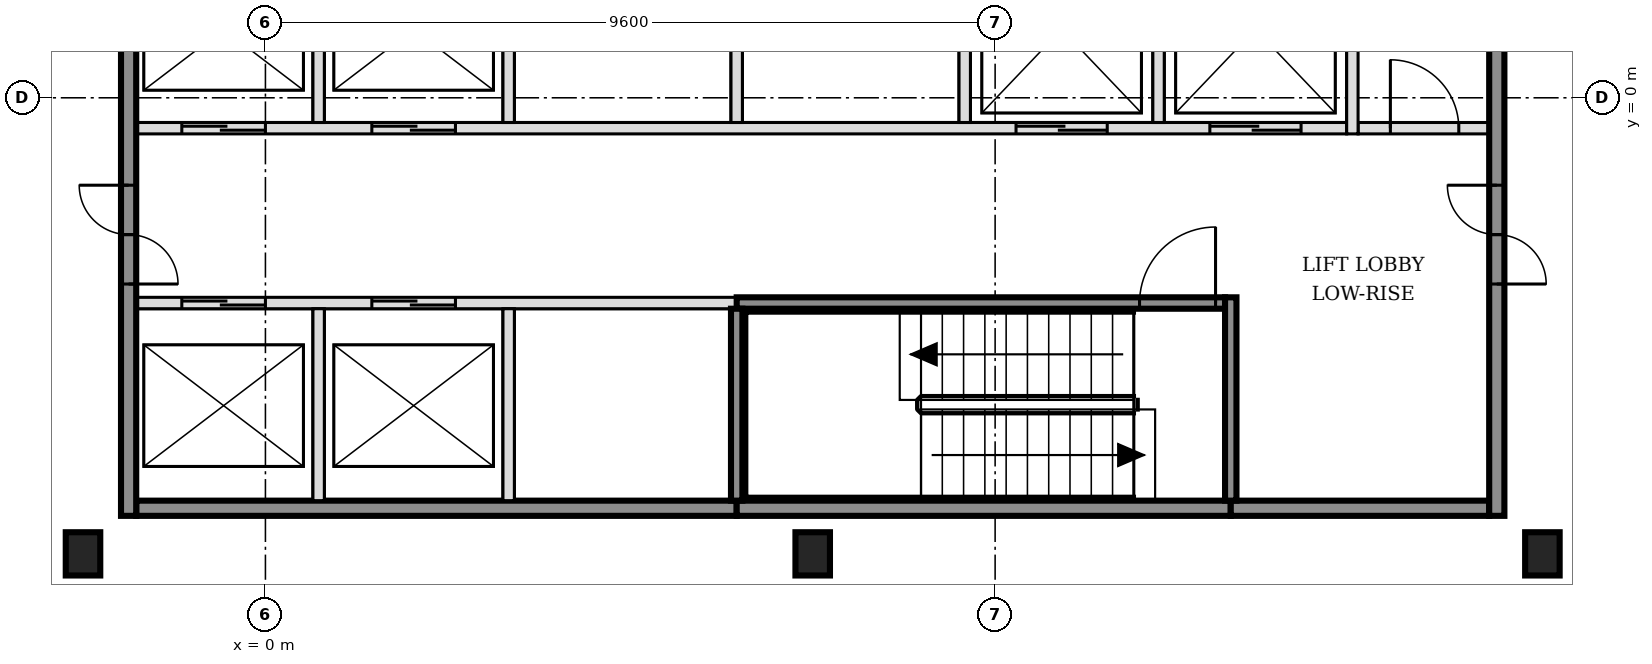
"""IFC4 building model, lengths in metres.
Left out: names, types, materials, properties, quantities, classifications, styles, units other than length and angle.
Written with IfcOpenShell. Run it as: python <this file> out.ifc"""

import sys

from ifc_helpers import new_model, si_unit, direction, frame, frame_2d, origin, origin_2d, place, context, subcontext, project, spatial, rectangle, i_section, extrude, element, fill, save


model = new_model("IFC4")
c1 = context("Model", 3, precision=1e-05, world=origin(), true_north=direction((0.0, 1.0)))
c2 = subcontext(c1, "Body", "Model", "MODEL_VIEW")
j1 = project(units=[si_unit("LENGTHUNIT", "METRE"), si_unit("PLANEANGLEUNIT", "RADIAN")], contexts=[c1])
p1 = place(None, origin())
s1 = spatial("IfcSite", under=j1, at=p1, CompositionType="ELEMENT")
p2 = place(p1, origin())
s2 = spatial("IfcBuilding", under=s1, at=p2, CompositionType="ELEMENT")
p3 = place(p2, frame((0.0, 0.0, 47.4)))
s3 = spatial("IfcBuildingStorey", under=s2, at=p3, CompositionType="ELEMENT", Elevation=47.4)
for number, where, z_axis, x_axis in (
    (1, (-2.4, -6.0, -0.15), (0.0, 0.0, 1.0), (1.0, 0.0, 0.0)),
    (2, (7.2, -6.0, -0.15), (0.0, 0.0, 1.0), (1.0, 0.0, 0.0)),
    (3, (16.8, -6.0, -0.15), (0.0, 0.0, 1.0), (1.0, 0.0, 0.0)),
):
    element("IfcColumn", number, at=place(p3, frame(where, z_axis=z_axis, x_axis=x_axis)), inside=s3, PredefinedType="COLUMN", context=c2, shape_type="SweptSolid", body=[
        extrude(i_section(OverallWidth=0.454, OverallDepth=0.569, WebThickness=0.078, FlangeThickness=0.125, FilletRadius=0.015, at=origin_2d()), origin(), (0.0, 0.0, 1.0), 3.6),
    ])
p4 = place(p3, frame((-1.7, -5.4, 0.0), z_axis=(0.0, 0.0, 1.0), x_axis=(1.0, 0.0, 0.0)))
e4 = element("IfcWall", 4, at=p4, inside=s3, PredefinedType="SOLIDWALL", context=c2, shape_type="SweptSolid", body=[
    extrude(rectangle(XDim=7.9, YDim=0.2, at=frame_2d((3.95, 0.0))), origin(), (0.0, 0.0, 1.0), 3.45),
])
p5 = place(p3, frame((6.2, -5.4, 0.0), z_axis=(0.0, 0.0, 1.0), x_axis=(1.0, 0.0, 0.0)))
e5 = element("IfcWall", 5, at=p5, inside=s3, PredefinedType="SOLIDWALL", context=c2, shape_type="SweptSolid", body=[
    extrude(rectangle(XDim=6.5, YDim=0.2, at=frame_2d((3.25, 0.0))), origin(), (0.0, 0.0, 1.0), 3.45),
])
p6 = place(p3, frame((12.7, -5.4, 0.0), z_axis=(0.0, 0.0, 1.0), x_axis=(1.0, 0.0, 0.0)))
e6 = element("IfcWall", 6, at=p6, inside=s3, PredefinedType="SOLIDWALL", context=c2, shape_type="SweptSolid", body=[
    extrude(rectangle(XDim=3.4, YDim=0.2, at=frame_2d((1.7, 0.0))), origin(), (0.0, 0.0, 1.0), 3.45),
])
p7 = place(p3, frame((-1.7, -2.7, 0.0), z_axis=(0.0, 0.0, 1.0), x_axis=(1.0, 0.0, 0.0)))
e7 = element("IfcWall", 7, at=p7, inside=s3, PredefinedType="SOLIDWALL", context=c2, shape_type="SweptSolid", body=[
    extrude(rectangle(XDim=7.9, YDim=0.15, at=frame_2d((3.95, 0.0))), origin(), (0.0, 0.0, 1.0), 3.45),
])
p8 = place(p7, frame((0.6, 0.0, 0.0)))
e8 = element("IfcOpeningElement", 8, at=p8, cuts=e7, PredefinedType="OPENING", context=c2, shape_type="SweptSolid", body=[
    extrude(rectangle(XDim=1.1, YDim=2.1, at=frame_2d((0.55, 1.05))), frame((0.0, 0.085, 0.0), z_axis=(0.0, -1.0, 0.0), x_axis=(1.0, 0.0, 0.0)), (0.0, 0.0, 1.0), 0.17),
])
p9 = place(p7, frame((3.1, 0.0, 0.0)))
e9 = element("IfcOpeningElement", 9, at=p9, cuts=e7, PredefinedType="OPENING", context=c2, shape_type="SweptSolid", body=[
    extrude(rectangle(XDim=1.1, YDim=2.1, at=frame_2d((0.55, 1.05))), frame((0.0, 0.085, 0.0), z_axis=(0.0, -1.0, 0.0), x_axis=(1.0, 0.0, 0.0)), (0.0, 0.0, 1.0), 0.17),
])
p10 = place(p3, frame((6.2, -2.7, 0.0), z_axis=(0.0, 0.0, 1.0), x_axis=(1.0, 0.0, 0.0)))
e10 = element("IfcWall", 10, at=p10, inside=s3, PredefinedType="SOLIDWALL", context=c2, shape_type="SweptSolid", body=[
    extrude(rectangle(XDim=6.425, YDim=0.15, at=frame_2d((3.212, 0.0))), origin(), (0.0, 0.0, 1.0), 3.45),
])
p11 = place(p10, frame((5.3, 0.0, 0.0)))
e11 = element("IfcOpeningElement", 11, at=p11, cuts=e10, PredefinedType="OPENING", context=c2, shape_type="SweptSolid", body=[
    extrude(rectangle(XDim=1.0, YDim=2.1, at=frame_2d((0.5, 1.05))), frame((0.0, 0.085, 0.0), z_axis=(0.0, -1.0, 0.0), x_axis=(1.0, 0.0, 0.0)), (0.0, 0.0, 1.0), 0.17),
])
p12 = place(p3, frame((-1.7, -0.4, 0.0), z_axis=(0.0, 0.0, 1.0), x_axis=(1.0, 0.0, 0.0)))
e12 = element("IfcWall", 12, at=p12, inside=s3, PredefinedType="SOLIDWALL", context=c2, shape_type="SweptSolid", body=[
    extrude(rectangle(XDim=15.925, YDim=0.15, at=frame_2d((7.962, 0.0))), origin(), (0.0, 0.0, 1.0), 3.45),
])
p13 = place(p12, frame((0.6, 0.0, 0.0)))
e13 = element("IfcOpeningElement", 13, at=p13, cuts=e12, PredefinedType="OPENING", context=c2, shape_type="SweptSolid", body=[
    extrude(rectangle(XDim=1.1, YDim=2.1, at=frame_2d((0.55, 1.05))), frame((0.0, 0.085, 0.0), z_axis=(0.0, -1.0, 0.0), x_axis=(1.0, 0.0, 0.0)), (0.0, 0.0, 1.0), 0.17),
])
p14 = place(p12, frame((3.1, 0.0, 0.0)))
e14 = element("IfcOpeningElement", 14, at=p14, cuts=e12, PredefinedType="OPENING", context=c2, shape_type="SweptSolid", body=[
    extrude(rectangle(XDim=1.1, YDim=2.1, at=frame_2d((0.55, 1.05))), frame((0.0, 0.085, 0.0), z_axis=(0.0, -1.0, 0.0), x_axis=(1.0, 0.0, 0.0)), (0.0, 0.0, 1.0), 0.17),
])
p15 = place(p12, frame((11.575, 0.0, 0.0)))
e15 = element("IfcOpeningElement", 15, at=p15, cuts=e12, PredefinedType="OPENING", context=c2, shape_type="SweptSolid", body=[
    extrude(rectangle(XDim=1.2, YDim=2.1, at=frame_2d((0.6, 1.05))), frame((0.0, 0.085, 0.0), z_axis=(0.0, -1.0, 0.0), x_axis=(1.0, 0.0, 0.0)), (0.0, 0.0, 1.0), 0.17),
])
p16 = place(p12, frame((14.125, 0.0, 0.0)))
e16 = element("IfcOpeningElement", 16, at=p16, cuts=e12, PredefinedType="OPENING", context=c2, shape_type="SweptSolid", body=[
    extrude(rectangle(XDim=1.2, YDim=2.1, at=frame_2d((0.6, 1.05))), frame((0.0, 0.085, 0.0), z_axis=(0.0, -1.0, 0.0), x_axis=(1.0, 0.0, 0.0)), (0.0, 0.0, 1.0), 0.17),
])
p17 = place(p3, frame((14.375, -0.4, 0.0), z_axis=(0.0, 0.0, 1.0), x_axis=(1.0, 0.0, 0.0)))
e17 = element("IfcWall", 17, at=p17, inside=s3, PredefinedType="PARTITIONING", context=c2, shape_type="SweptSolid", body=[
    extrude(rectangle(XDim=1.725, YDim=0.15, at=frame_2d((0.863, 0.0))), origin(), (0.0, 0.0, 1.0), 3.45),
])
p18 = place(p17, frame((0.425, 0.0, 0.0)))
e18 = element("IfcOpeningElement", 18, at=p18, cuts=e17, PredefinedType="OPENING", context=c2, shape_type="SweptSolid", body=[
    extrude(rectangle(XDim=0.9, YDim=2.1, at=frame_2d((0.45, 1.05))), frame((0.0, 0.085, 0.0), z_axis=(0.0, -1.0, 0.0), x_axis=(1.0, 0.0, 0.0)), (0.0, 0.0, 1.0), 0.17),
])
p19 = place(p3, frame((-1.8, -5.5, 0.0), z_axis=(0.0, 0.0, 1.0), x_axis=(0.0, 1.0, 0.0)))
e19 = element("IfcWall", 19, at=p19, inside=s3, PredefinedType="SOLIDWALL", context=c2, shape_type="SweptSolid", body=[
    extrude(rectangle(XDim=15.8, YDim=0.2, at=frame_2d((7.9, 0.0))), origin(), (0.0, 0.0, 1.0), 3.45),
])
p20 = place(p19, frame((3.05, 0.0, 0.0)))
e20 = element("IfcOpeningElement", 20, at=p20, cuts=e19, PredefinedType="OPENING", context=c2, shape_type="SweptSolid", body=[
    extrude(rectangle(XDim=1.3, YDim=2.1, at=frame_2d((0.65, 1.05))), frame((0.0, 0.11, 0.0), z_axis=(0.0, -1.0, 0.0), x_axis=(1.0, 0.0, 0.0)), (0.0, 0.0, 1.0), 0.22),
])
p21 = place(p19, frame((11.45, 0.0, 0.0)))
e21 = element("IfcOpeningElement", 21, at=p21, cuts=e19, PredefinedType="OPENING", context=c2, shape_type="SweptSolid", body=[
    extrude(rectangle(XDim=1.3, YDim=2.1, at=frame_2d((0.65, 1.05))), frame((0.0, 0.11, 0.0), z_axis=(0.0, -1.0, 0.0), x_axis=(1.0, 0.0, 0.0)), (0.0, 0.0, 1.0), 0.22),
])
p22 = place(p3, frame((0.7, -5.3, 0.0), z_axis=(0.0, 0.0, 1.0), x_axis=(0.0, 1.0, 0.0)))
e22 = element("IfcWall", 22, at=p22, inside=s3, PredefinedType="SOLIDWALL", context=c2, shape_type="SweptSolid", body=[
    extrude(rectangle(XDim=2.525, YDim=0.15, at=frame_2d((1.263, 0.0))), origin(), (0.0, 0.0, 1.0), 3.45),
])
p23 = place(p3, frame((0.7, -0.325, 0.0), z_axis=(0.0, 0.0, 1.0), x_axis=(0.0, 1.0, 0.0)))
e23 = element("IfcWall", 23, at=p23, inside=s3, PredefinedType="SOLIDWALL", context=c2, shape_type="SweptSolid", body=[
    extrude(rectangle(XDim=2.45, YDim=0.15, at=frame_2d((1.225, 0.0))), origin(), (0.0, 0.0, 1.0), 3.45),
])
p24 = place(p3, frame((3.2, -5.3, 0.0), z_axis=(0.0, 0.0, 1.0), x_axis=(0.0, 1.0, 0.0)))
e24 = element("IfcWall", 24, at=p24, inside=s3, PredefinedType="SOLIDWALL", context=c2, shape_type="SweptSolid", body=[
    extrude(rectangle(XDim=2.525, YDim=0.15, at=frame_2d((1.263, 0.0))), origin(), (0.0, 0.0, 1.0), 3.45),
])
p25 = place(p3, frame((3.2, -0.325, 0.0), z_axis=(0.0, 0.0, 1.0), x_axis=(0.0, 1.0, 0.0)))
e25 = element("IfcWall", 25, at=p25, inside=s3, PredefinedType="SOLIDWALL", context=c2, shape_type="SweptSolid", body=[
    extrude(rectangle(XDim=2.45, YDim=0.15, at=frame_2d((1.225, 0.0))), origin(), (0.0, 0.0, 1.0), 3.45),
])
p26 = place(p3, frame((6.2, -5.3, 0.0), z_axis=(0.0, 0.0, 1.0), x_axis=(0.0, 1.0, 0.0)))
e26 = element("IfcWall", 26, at=p26, inside=s3, PredefinedType="SOLIDWALL", context=c2, shape_type="SweptSolid", body=[
    extrude(rectangle(XDim=2.525, YDim=0.15, at=frame_2d((1.263, 0.0))), origin(), (0.0, 0.0, 1.0), 3.45),
])
for number, where, z_axis, x_axis in (
    (27, (6.2, -0.325, 0.0), (0.0, 0.0, 1.0), (0.0, 1.0, 0.0)),
    (28, (9.2, -0.325, 0.0), (0.0, 0.0, 1.0), (0.0, 1.0, 0.0)),
    (29, (11.75, -0.325, 0.0), (0.0, 0.0, 1.0), (0.0, 1.0, 0.0)),
):
    element("IfcWall", number, at=place(p3, frame(where, z_axis=z_axis, x_axis=x_axis)), inside=s3, PredefinedType="SOLIDWALL", context=c2, shape_type="SweptSolid", body=[
        extrude(rectangle(XDim=2.45, YDim=0.15, at=frame_2d((1.225, 0.0))), origin(), (0.0, 0.0, 1.0), 3.45),
    ])
p27 = place(p3, frame((12.7, -5.3, 0.0), z_axis=(0.0, 0.0, 1.0), x_axis=(0.0, 1.0, 0.0)))
e30 = element("IfcWall", 30, at=p27, inside=s3, PredefinedType="SOLIDWALL", context=c2, shape_type="SweptSolid", body=[
    extrude(rectangle(XDim=2.675, YDim=0.15, at=frame_2d((1.337, 0.0))), origin(), (0.0, 0.0, 1.0), 3.45),
])
p28 = place(p3, frame((14.3, -0.475, 0.0), z_axis=(0.0, 0.0, 1.0), x_axis=(0.0, 1.0, 0.0)))
e31 = element("IfcWall", 31, at=p28, inside=s3, PredefinedType="SOLIDWALL", context=c2, shape_type="SweptSolid", body=[
    extrude(rectangle(XDim=2.75, YDim=0.15, at=frame_2d((1.375, 0.0))), origin(), (0.0, 0.0, 1.0), 3.45),
])
p29 = place(p3, frame((16.2, -5.5, 0.0), z_axis=(0.0, 0.0, 1.0), x_axis=(0.0, 1.0, 0.0)))
e32 = element("IfcWall", 32, at=p29, inside=s3, PredefinedType="SOLIDWALL", context=c2, shape_type="SweptSolid", body=[
    extrude(rectangle(XDim=15.8, YDim=0.2, at=frame_2d((7.9, 0.0))), origin(), (0.0, 0.0, 1.0), 3.45),
])
p30 = place(p29, frame((3.05, 0.0, 0.0)))
e33 = element("IfcOpeningElement", 33, at=p30, cuts=e32, PredefinedType="OPENING", context=c2, shape_type="SweptSolid", body=[
    extrude(rectangle(XDim=1.3, YDim=2.1, at=frame_2d((0.65, 1.05))), frame((0.0, 0.11, 0.0), z_axis=(0.0, -1.0, 0.0), x_axis=(1.0, 0.0, 0.0)), (0.0, 0.0, 1.0), 0.22),
])
p31 = place(p29, frame((11.45, 0.0, 0.0)))
e34 = element("IfcOpeningElement", 34, at=p31, cuts=e32, PredefinedType="OPENING", context=c2, shape_type="SweptSolid", body=[
    extrude(rectangle(XDim=1.3, YDim=2.1, at=frame_2d((0.65, 1.05))), frame((0.0, 0.11, 0.0), z_axis=(0.0, -1.0, 0.0), x_axis=(1.0, 0.0, 0.0)), (0.0, 0.0, 1.0), 0.22),
])
p32 = place(p8, origin())
e35 = element("IfcDoor", 35, at=p32, inside=s3, OperationType="DOUBLE_DOOR_SLIDING", PredefinedType="DOOR", context=c2, shape_type="SweptSolid", body=[
    extrude(rectangle(XDim=1.1, YDim=2.1, at=frame_2d((0.55, 1.05))), frame((0.0, 0.025, 0.0), z_axis=(0.0, -1.0, 0.0), x_axis=(1.0, 0.0, 0.0)), (0.0, 0.0, 1.0), 0.05),
])
fill(e8, e35)
p33 = place(p9, origin())
e36 = element("IfcDoor", 36, at=p33, inside=s3, OperationType="DOUBLE_DOOR_SLIDING", PredefinedType="DOOR", context=c2, shape_type="SweptSolid", body=[
    extrude(rectangle(XDim=1.1, YDim=2.1, at=frame_2d((0.55, 1.05))), frame((0.0, 0.025, 0.0), z_axis=(0.0, -1.0, 0.0), x_axis=(1.0, 0.0, 0.0)), (0.0, 0.0, 1.0), 0.05),
])
fill(e9, e36)
p34 = place(p13, origin())
e37 = element("IfcDoor", 37, at=p34, inside=s3, OperationType="DOUBLE_DOOR_SLIDING", PredefinedType="DOOR", context=c2, shape_type="SweptSolid", body=[
    extrude(rectangle(XDim=1.1, YDim=2.1, at=frame_2d((0.55, 1.05))), frame((0.0, 0.025, 0.0), z_axis=(0.0, -1.0, 0.0), x_axis=(1.0, 0.0, 0.0)), (0.0, 0.0, 1.0), 0.05),
])
fill(e13, e37)
p35 = place(p14, origin())
e38 = element("IfcDoor", 38, at=p35, inside=s3, OperationType="DOUBLE_DOOR_SLIDING", PredefinedType="DOOR", context=c2, shape_type="SweptSolid", body=[
    extrude(rectangle(XDim=1.1, YDim=2.1, at=frame_2d((0.55, 1.05))), frame((0.0, 0.025, 0.0), z_axis=(0.0, -1.0, 0.0), x_axis=(1.0, 0.0, 0.0)), (0.0, 0.0, 1.0), 0.05),
])
fill(e14, e38)
p36 = place(p15, origin())
e39 = element("IfcDoor", 39, at=p36, inside=s3, OperationType="DOUBLE_DOOR_SLIDING", PredefinedType="DOOR", context=c2, shape_type="SweptSolid", body=[
    extrude(rectangle(XDim=1.2, YDim=2.1, at=frame_2d((0.6, 1.05))), frame((0.0, 0.025, 0.0), z_axis=(0.0, -1.0, 0.0), x_axis=(1.0, 0.0, 0.0)), (0.0, 0.0, 1.0), 0.05),
])
fill(e15, e39)
p37 = place(p16, origin())
e40 = element("IfcDoor", 40, at=p37, inside=s3, OperationType="DOUBLE_DOOR_SLIDING", PredefinedType="DOOR", context=c2, shape_type="SweptSolid", body=[
    extrude(rectangle(XDim=1.2, YDim=2.1, at=frame_2d((0.6, 1.05))), frame((0.0, 0.025, 0.0), z_axis=(0.0, -1.0, 0.0), x_axis=(1.0, 0.0, 0.0)), (0.0, 0.0, 1.0), 0.05),
])
fill(e16, e40)
p38 = place(p11, origin())
e41 = element("IfcDoor", 41, at=p38, inside=s3, OperationType="SINGLE_SWING_RIGHT", PredefinedType="DOOR", context=c2, shape_type="SweptSolid", body=[
    extrude(rectangle(XDim=1.0, YDim=2.1, at=frame_2d((0.5, 1.05))), frame((0.0, 0.025, 0.0), z_axis=(0.0, -1.0, 0.0), x_axis=(1.0, 0.0, 0.0)), (0.0, 0.0, 1.0), 0.05),
])
fill(e11, e41)
p39 = place(p20, origin())
e42 = element("IfcDoor", 42, at=p39, inside=s3, OperationType="DOUBLE_DOOR_SINGLE_SWING", PredefinedType="DOOR", context=c2, shape_type="SweptSolid", body=[
    extrude(rectangle(XDim=1.3, YDim=2.1, at=frame_2d((0.65, 1.05))), frame((0.0, 0.025, 0.0), z_axis=(0.0, -1.0, 0.0), x_axis=(1.0, 0.0, 0.0)), (0.0, 0.0, 1.0), 0.05),
])
fill(e20, e42)
p40 = place(p30, origin())
e43 = element("IfcDoor", 43, at=p40, inside=s3, OperationType="DOUBLE_DOOR_SINGLE_SWING", PredefinedType="DOOR", context=c2, shape_type="SweptSolid", body=[
    extrude(rectangle(XDim=1.3, YDim=2.1, at=frame_2d((0.65, 1.05))), frame((0.0, 0.025, 0.0), z_axis=(0.0, -1.0, 0.0), x_axis=(1.0, 0.0, 0.0)), (0.0, 0.0, 1.0), 0.05),
])
fill(e33, e43)
p41 = place(p18, origin())
e44 = element("IfcDoor", 44, at=p41, inside=s3, OperationType="SINGLE_SWING_LEFT", PredefinedType="DOOR", context=c2, shape_type="SweptSolid", body=[
    extrude(rectangle(XDim=0.9, YDim=2.1, at=frame_2d((0.45, 1.05))), frame((0.0, 0.025, 0.0), z_axis=(0.0, -1.0, 0.0), x_axis=(1.0, 0.0, 0.0)), (0.0, 0.0, 1.0), 0.05),
])
fill(e18, e44)
save(model, sys.argv[1])
